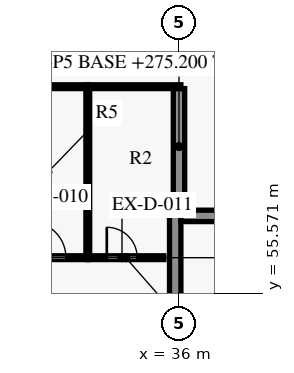
"""IFC4 building model, lengths in metres.
Left out: names, types, materials, properties, quantities, classifications, styles, units other than length and angle.
Written with IfcOpenShell. Run it as: python <this file> out.ifc"""

import sys

from ifc_helpers import new_model, si_unit, direction, frame, frame_2d, origin, place, context, subcontext, project, spatial, rectangle, extrude, element, fill, save


model = new_model("IFC4")
c1 = context("Model", 3, precision=1e-05, world=origin(), true_north=direction((0.0, 1.0)))
c2 = subcontext(c1, "Body", "Model", "MODEL_VIEW")
j1 = project(units=[si_unit("LENGTHUNIT", "METRE"), si_unit("PLANEANGLEUNIT", "RADIAN")], contexts=[c1])
p1 = place(None, origin())
s1 = spatial("IfcSite", under=j1, at=p1, CompositionType="ELEMENT")
p2 = place(p1, origin())
s2 = spatial("IfcBuilding", under=s1, at=p2, CompositionType="ELEMENT")
p3 = place(p2, frame((0.0, 0.0, 275.2)))
s3 = spatial("IfcBuildingStorey", under=s2, at=p3, CompositionType="ELEMENT", Elevation=275.2)
p4 = place(p3, frame((36.05, 57.6, 0.0), z_axis=(0.0, 0.0, 1.0), x_axis=(1.0, 0.0, 0.0)))
e1 = element("IfcWall", 1, at=p4, inside=s3, PredefinedType="SHEAR", context=c2, shape_type="SweptSolid", body=[
    extrude(rectangle(XDim=7.7, YDim=0.3, at=frame_2d((3.85, 0.0))), origin(), (0.0, 0.0, 1.0), 3.5),
])
p5 = place(p3, frame((35.9, 53.85, 0.0), z_axis=(0.0, 0.0, 1.0), x_axis=(0.0, 1.0, 0.0)))
e2 = element("IfcWall", 2, at=p5, inside=s3, PredefinedType="SHEAR", context=c2, shape_type="SweptSolid", body=[
    extrude(rectangle(XDim=3.9, YDim=0.3, at=frame_2d((1.95, 0.0))), origin(), (0.0, 0.0, 1.0), 3.5),
])
p6 = place(p3, frame((31.5, 56.5, 0.0), z_axis=(0.0, 0.0, 1.0), x_axis=(1.0, 0.0, 0.0)))
e3 = element("IfcWall", 3, at=p6, inside=s3, PredefinedType="PARTITIONING", context=c2, shape_type="SweptSolid", body=[
    extrude(rectangle(XDim=2.1, YDim=0.1, at=frame_2d((1.05, 0.0))), origin(), (0.0, 0.0, 1.0), 3.33),
])
p7 = place(p6, frame((0.575, 0.0, 0.0)))
e4 = element("IfcOpeningElement", 4, at=p7, cuts=e3, PredefinedType="OPENING", context=c2, shape_type="SweptSolid", body=[
    extrude(rectangle(XDim=0.95, YDim=2.1, at=frame_2d((0.475, 1.05))), frame((0.0, 0.06, 0.0), z_axis=(0.0, -1.0, 0.0), x_axis=(1.0, 0.0, 0.0)), (0.0, 0.0, 1.0), 0.12),
])
p8 = place(p3, frame((33.6, 56.5, 0.0), z_axis=(0.0, 0.0, 1.0), x_axis=(1.0, 0.0, 0.0)))
e5 = element("IfcWall", 5, at=p8, inside=s3, PredefinedType="PARTITIONING", context=c2, shape_type="SweptSolid", body=[
    extrude(rectangle(XDim=2.0, YDim=0.1, at=frame_2d((1.0, 0.0))), origin(), (0.0, 0.0, 1.0), 2.88),
])
p9 = place(p8, frame((0.5, 0.0, 0.0)))
e6 = element("IfcOpeningElement", 6, at=p9, cuts=e5, PredefinedType="OPENING", context=c2, shape_type="SweptSolid", body=[
    extrude(rectangle(XDim=0.8, YDim=2.1, at=frame_2d((0.4, 1.05))), frame((0.0, 0.06, 0.0), z_axis=(0.0, -1.0, 0.0), x_axis=(1.0, 0.0, 0.0)), (0.0, 0.0, 1.0), 0.12),
])
p10 = place(p3, frame((33.6, 60.95, 0.0), z_axis=(0.0, 0.0, 1.0), x_axis=(0.0, -1.0, 0.0)))
e7 = element("IfcWall", 7, at=p10, inside=s3, PredefinedType="PARTITIONING", context=c2, shape_type="SweptSolid", body=[
    extrude(rectangle(XDim=4.4, YDim=0.1, at=frame_2d((2.2, 0.0))), origin(), (0.0, 0.0, 1.0), 1.98),
])
p11 = place(p3, frame((36.0, 60.95, 0.0), z_axis=(0.0, 0.0, 1.0), x_axis=(0.0, -1.0, 0.0)))
e8 = element("IfcWall", 8, at=p11, inside=s3, PredefinedType="PARTITIONING", context=c2, shape_type="SweptSolid", body=[
    extrude(rectangle(XDim=3.05, YDim=0.3, at=frame_2d((1.525, 0.0))), origin(), (0.0, 0.0, 1.0), 1.98),
])
p12 = place(p3, frame((31.5, 61.0, 0.0), z_axis=(0.0, 0.0, 1.0), x_axis=(1.0, 0.0, 0.0)))
e9 = element("IfcWall", 9, at=p12, inside=s3, PredefinedType="PARTITIONING", context=c2, shape_type="SweptSolid", body=[
    extrude(rectangle(XDim=2.1, YDim=0.1, at=frame_2d((1.05, 0.0))), origin(), (0.0, 0.0, 1.0), 1.98),
])
p13 = place(p3, frame((33.6, 61.0, 0.0), z_axis=(0.0, 0.0, 1.0), x_axis=(1.0, 0.0, 0.0)))
e10 = element("IfcWall", 10, at=p13, inside=s3, PredefinedType="PARTITIONING", context=c2, shape_type="SweptSolid", body=[
    extrude(rectangle(XDim=2.45, YDim=0.1, at=frame_2d((1.225, 0.0))), origin(), (0.0, 0.0, 1.0), 2.73),
])
p14 = place(p7, origin())
e11 = element("IfcDoor", 11, at=p14, inside=s3, OperationType="SINGLE_SWING_LEFT", PredefinedType="DOOR", context=c2, shape_type="SweptSolid", body=[
    extrude(rectangle(XDim=0.95, YDim=2.1, at=frame_2d((0.475, 1.05))), frame((0.0, 0.025, 0.0), z_axis=(0.0, -1.0, 0.0), x_axis=(1.0, 0.0, 0.0)), (0.0, 0.0, 1.0), 0.05),
])
fill(e4, e11)
p15 = place(p9, origin())
e12 = element("IfcDoor", 12, at=p15, inside=s3, OperationType="SINGLE_SWING_LEFT", PredefinedType="DOOR", context=c2, shape_type="SweptSolid", body=[
    extrude(rectangle(XDim=0.8, YDim=2.1, at=frame_2d((0.4, 1.05))), frame((0.0, 0.025, 0.0), z_axis=(0.0, -1.0, 0.0), x_axis=(1.0, 0.0, 0.0)), (0.0, 0.0, 1.0), 0.05),
])
fill(e6, e12)
save(model, sys.argv[1])
